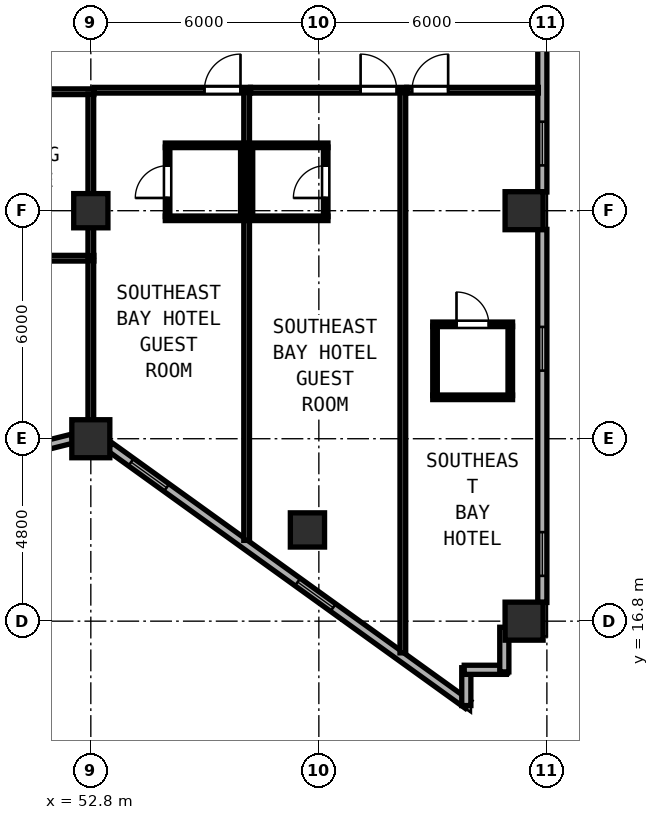
"""IFC4 building model, lengths in metres.
Left out: names, types, materials, properties, quantities, classifications, styles, units other than length and angle.
Written with IfcOpenShell. Run it as: python <this file> out.ifc"""

import sys

from ifc_helpers import new_model, si_unit, direction, frame, frame_2d, origin, origin_2d, place, context, subcontext, project, spatial, rectangle, hollow_rectangle, extrude, element, fill, save


model = new_model("IFC4")
c1 = context("Model", 3, precision=1e-05, world=origin(), true_north=direction((0.0, 1.0)))
c2 = subcontext(c1, "Body", "Model", "MODEL_VIEW")
j1 = project(units=[si_unit("LENGTHUNIT", "METRE"), si_unit("PLANEANGLEUNIT", "RADIAN")], contexts=[c1])
p1 = place(None, origin())
s1 = spatial("IfcSite", under=j1, at=p1, CompositionType="ELEMENT")
p2 = place(p1, origin())
s2 = spatial("IfcBuilding", under=s1, at=p2, CompositionType="ELEMENT")
p3 = place(p2, frame((0.0, 0.0, 152.4)))
s3 = spatial("IfcBuildingStorey", under=s2, at=p3, CompositionType="ELEMENT", Elevation=152.4)
for number, where, z_axis, x_axis in (
    (1, (52.8, 21.6, 0.0), (0.0, 0.0, 1.0), (1.0, 0.0, 0.0)),
    (2, (64.2, 16.8, 0.0), (0.0, 0.0, 1.0), (1.0, 0.0, 0.0)),
    (3, (64.2, 27.6, 0.0), (0.0, 0.0, 1.0), (1.0, 0.0, 0.0)),
):
    element("IfcColumn", number, at=place(p3, frame(where, z_axis=z_axis, x_axis=x_axis)), inside=s3, PredefinedType="COLUMN", context=c2, shape_type="SweptSolid", body=[
        extrude(hollow_rectangle(XDim=1.0, YDim=1.0, WallThickness=0.038, at=origin_2d()), origin(), (0.0, 0.0, 1.0), 3.8),
    ])
for number, where, z_axis, x_axis in (
    (4, (52.8, 27.6, 0.0), (0.0, 0.0, 1.0), (1.0, 0.0, 0.0)),
    (5, (58.5, 19.2, 0.0), (0.0, 0.0, 1.0), (1.0, 0.0, 0.0)),
):
    element("IfcColumn", number, at=place(p3, frame(where, z_axis=z_axis, x_axis=x_axis)), inside=s3, PredefinedType="COLUMN", context=c2, shape_type="SweptSolid", body=[
        extrude(hollow_rectangle(XDim=0.9, YDim=0.9, WallThickness=0.034, at=origin_2d()), origin(), (0.0, 0.0, 1.0), 3.8),
    ])
p4 = place(p3, frame((47.932, 20.507, 0.0), z_axis=(0.0, 0.0, 1.0), x_axis=(0.970145683738, 0.242522890311, 0.0)))
e6 = element("IfcWall", 6, at=p4, inside=s3, PredefinedType="SOLIDWALL", context=c2, shape_type="SweptSolid", body=[
    extrude(rectangle(XDim=4.511, YDim=0.24, at=frame_2d((2.255, 0.0))), origin(), (0.0, 0.0, 1.0), 3.145),
])
p5 = place(p4, frame((1.156, 0.0, 0.85)))
e7 = element("IfcOpeningElement", 7, at=p5, cuts=e6, PredefinedType="OPENING", context=c2, shape_type="SweptSolid", body=[
    extrude(rectangle(XDim=1.15, YDim=1.8, at=frame_2d((0.575, 0.9))), frame((0.0, 0.13, 0.0), z_axis=(0.0, -1.0, 0.0), x_axis=(1.0, 0.0, 0.0)), (0.0, 0.0, 1.0), 0.26),
])
p6 = place(p3, frame((53.292, 21.394, 0.0), z_axis=(0.0, 0.0, 1.0), x_axis=(0.811543504691, -0.584291998913, 0.0)))
e8 = element("IfcWall", 8, at=p6, inside=s3, PredefinedType="SOLIDWALL", context=c2, shape_type="SweptSolid", body=[
    extrude(rectangle(XDim=11.623, YDim=0.24, at=frame_2d((5.812, 0.0))), origin(), (0.0, 0.0, 1.0), 3.145),
])
p7 = place(p6, frame((0.7, 0.0, 0.85)))
e9 = element("IfcOpeningElement", 9, at=p7, cuts=e8, PredefinedType="OPENING", context=c2, shape_type="SweptSolid", body=[
    extrude(rectangle(XDim=1.15, YDim=1.8, at=frame_2d((0.575, 0.9))), frame((0.0, 0.13, 0.0), z_axis=(0.0, -1.0, 0.0), x_axis=(1.0, 0.0, 0.0)), (0.0, 0.0, 1.0), 0.26),
])
p8 = place(p6, frame((6.1, 0.0, 0.85)))
e10 = element("IfcOpeningElement", 10, at=p8, cuts=e8, PredefinedType="OPENING", context=c2, shape_type="SweptSolid", body=[
    extrude(rectangle(XDim=1.15, YDim=1.8, at=frame_2d((0.575, 0.9))), frame((0.0, 0.13, 0.0), z_axis=(0.0, -1.0, 0.0), x_axis=(1.0, 0.0, 0.0)), (0.0, 0.0, 1.0), 0.26),
])
p9 = place(p3, frame((62.68, 14.579, 0.0), z_axis=(0.0, 0.0, 1.0), x_axis=(0.0, 1.0, 0.0)))
e11 = element("IfcWall", 11, at=p9, inside=s3, PredefinedType="SOLIDWALL", context=c2, shape_type="SweptSolid", body=[
    extrude(rectangle(XDim=0.996, YDim=0.24, at=frame_2d((0.498, 0.0))), origin(), (0.0, 0.0, 1.0), 3.6),
])
p10 = place(p3, frame((62.625, 15.52, 0.0), z_axis=(0.0, 0.0, 1.0), x_axis=(1.0, 0.0, 0.0)))
e12 = element("IfcWall", 12, at=p10, inside=s3, PredefinedType="SOLIDWALL", context=c2, shape_type="SweptSolid", body=[
    extrude(rectangle(XDim=1.11, YDim=0.24, at=frame_2d((0.555, 0.0))), origin(), (0.0, 0.0, 1.0), 3.6),
])
p11 = place(p3, frame((63.68, 15.465, 0.0), z_axis=(0.0, 0.0, 1.0), x_axis=(0.0, 1.0, 0.0)))
e13 = element("IfcWall", 13, at=p11, inside=s3, PredefinedType="SOLIDWALL", context=c2, shape_type="SweptSolid", body=[
    extrude(rectangle(XDim=1.175, YDim=0.24, at=frame_2d((0.587, 0.0))), origin(), (0.0, 0.0, 1.0), 3.6),
])
p12 = place(p3, frame((64.68, 17.292, 0.0), z_axis=(0.0, 0.0, 1.0), x_axis=(0.0, 1.0, 0.0)))
e14 = element("IfcWall", 14, at=p12, inside=s3, PredefinedType="SOLIDWALL", context=c2, shape_type="SweptSolid", body=[
    extrude(rectangle(XDim=9.816, YDim=0.24, at=frame_2d((4.908, 0.0))), origin(), (0.0, 0.0, 1.0), 3.6),
])
p13 = place(p12, frame((0.7, 0.0, 0.85)))
e15 = element("IfcOpeningElement", 15, at=p13, cuts=e14, PredefinedType="OPENING", context=c2, shape_type="SweptSolid", body=[
    extrude(rectangle(XDim=1.15, YDim=1.8, at=frame_2d((0.575, 0.9))), frame((0.0, 0.13, 0.0), z_axis=(0.0, -1.0, 0.0), x_axis=(1.0, 0.0, 0.0)), (0.0, 0.0, 1.0), 0.26),
])
p14 = place(p12, frame((6.1, 0.0, 0.85)))
e16 = element("IfcOpeningElement", 16, at=p14, cuts=e14, PredefinedType="OPENING", context=c2, shape_type="SweptSolid", body=[
    extrude(rectangle(XDim=1.15, YDim=1.8, at=frame_2d((0.575, 0.9))), frame((0.0, 0.13, 0.0), z_axis=(0.0, -1.0, 0.0), x_axis=(1.0, 0.0, 0.0)), (0.0, 0.0, 1.0), 0.26),
])
p15 = place(p3, frame((64.68, 28.092, 0.0), z_axis=(0.0, 0.0, 1.0), x_axis=(0.0, 1.0, 0.0)))
e17 = element("IfcWall", 17, at=p15, inside=s3, PredefinedType="SOLIDWALL", context=c2, shape_type="SweptSolid", body=[
    extrude(rectangle(XDim=9.443, YDim=0.24, at=frame_2d((4.721, 0.0))), origin(), (0.0, 0.0, 1.0), 3.6),
])
p16 = place(p15, frame((0.7, 0.0, 0.85)))
e18 = element("IfcOpeningElement", 18, at=p16, cuts=e17, PredefinedType="OPENING", context=c2, shape_type="SweptSolid", body=[
    extrude(rectangle(XDim=1.15, YDim=1.8, at=frame_2d((0.575, 0.9))), frame((0.0, 0.13, 0.0), z_axis=(0.0, -1.0, 0.0), x_axis=(1.0, 0.0, 0.0)), (0.0, 0.0, 1.0), 0.26),
])
p17 = place(p15, frame((6.1, 0.0, 0.85)))
e19 = element("IfcOpeningElement", 19, at=p17, cuts=e17, PredefinedType="OPENING", context=c2, shape_type="SweptSolid", body=[
    extrude(rectangle(XDim=1.15, YDim=1.8, at=frame_2d((0.575, 0.9))), frame((0.0, 0.13, 0.0), z_axis=(0.0, -1.0, 0.0), x_axis=(1.0, 0.0, 0.0)), (0.0, 0.0, 1.0), 0.26),
])
for number, where, z_axis, x_axis in (
    (20, (49.08, 30.73, 0.0), (0.0, 0.0, 1.0), (1.0, 0.0, 0.0)),
    (21, (49.08, 26.35, 0.0), (0.0, 0.0, 1.0), (1.0, 0.0, 0.0)),
):
    element("IfcWall", number, at=place(p3, frame(where, z_axis=z_axis, x_axis=x_axis)), inside=s3, PredefinedType="PARTITIONING", context=c2, shape_type="SweptSolid", body=[
        extrude(rectangle(XDim=3.8, YDim=0.15, at=frame_2d((1.9, 0.0))), origin(), (0.0, 0.0, 1.0), 3.6),
    ])
p18 = place(p3, frame((52.8, 26.41, 0.0), z_axis=(0.0, 0.0, 1.0), x_axis=(0.0, 1.0, 0.0)))
e22 = element("IfcWall", 22, at=p18, inside=s3, PredefinedType="PARTITIONING", context=c2, shape_type="SweptSolid", body=[
    extrude(rectangle(XDim=4.26, YDim=0.15, at=frame_2d((2.13, 0.0))), origin(), (0.0, 0.0, 1.0), 3.145),
])
p19 = place(p3, frame((52.882, 30.77, 0.0), z_axis=(0.0, 0.0, 1.0), x_axis=(1.0, 0.0, 0.0)))
e23 = element("IfcWall", 23, at=p19, inside=s3, PredefinedType="PARTITIONING", context=c2, shape_type="SweptSolid", body=[
    extrude(rectangle(XDim=4.118, YDim=0.15, at=frame_2d((2.059, 0.0))), origin(), (0.0, 0.0, 1.0), 3.6),
])
p20 = place(p19, frame((3.856, 0.0, 0.0), z_axis=(0.0, 0.0, 1.0), x_axis=(-1.0, 0.0, 0.0)))
e24 = element("IfcOpeningElement", 24, at=p20, cuts=e23, PredefinedType="OPENING", context=c2, shape_type="SweptSolid", body=[
    extrude(rectangle(XDim=0.95, YDim=2.15, at=frame_2d((0.475, 1.075))), frame((0.0, 0.085, 0.0), z_axis=(0.0, -1.0, 0.0), x_axis=(1.0, 0.0, 0.0)), (0.0, 0.0, 1.0), 0.17),
])
p21 = place(p3, frame((52.8, 21.819, 0.0), z_axis=(0.0, 0.0, 1.0), x_axis=(0.0, 1.0, 0.0)))
e25 = element("IfcWall", 25, at=p21, inside=s3, PredefinedType="PARTITIONING", context=c2, shape_type="SweptSolid", body=[
    extrude(rectangle(XDim=4.471, YDim=0.15, at=frame_2d((2.236, 0.0))), origin(), (0.0, 0.0, 1.0), 3.145),
])
p22 = place(p3, frame((56.9, 18.925, 0.0), z_axis=(0.0, 0.0, 1.0), x_axis=(0.0, 1.0, 0.0)))
e26 = element("IfcWall", 26, at=p22, inside=s3, PredefinedType="PARTITIONING", context=c2, shape_type="SweptSolid", body=[
    extrude(rectangle(XDim=11.785, YDim=0.15, at=frame_2d((5.892, 0.0))), origin(), (0.0, 0.0, 1.0), 3.6),
])
p23 = place(p3, frame((54.76, 29.32, 0.0), z_axis=(0.0, 0.0, 1.0), x_axis=(1.0, 0.0, 0.0)))
e27 = element("IfcWall", 27, at=p23, inside=s3, PredefinedType="PARTITIONING", context=c2, shape_type="SweptSolid", body=[
    extrude(rectangle(XDim=2.08, YDim=0.12, at=frame_2d((1.04, 0.0))), origin(), (0.0, 0.0, 1.0), 3.6),
])
p24 = place(p3, frame((54.76, 27.4, 0.0), z_axis=(0.0, 0.0, 1.0), x_axis=(1.0, 0.0, 0.0)))
e28 = element("IfcWall", 28, at=p24, inside=s3, PredefinedType="PARTITIONING", context=c2, shape_type="SweptSolid", body=[
    extrude(rectangle(XDim=2.08, YDim=0.12, at=frame_2d((1.04, 0.0))), origin(), (0.0, 0.0, 1.0), 3.145),
])
p25 = place(p3, frame((54.82, 27.445, 0.0), z_axis=(0.0, 0.0, 1.0), x_axis=(0.0, 1.0, 0.0)))
e29 = element("IfcWall", 29, at=p25, inside=s3, PredefinedType="PARTITIONING", context=c2, shape_type="SweptSolid", body=[
    extrude(rectangle(XDim=1.83, YDim=0.12, at=frame_2d((0.915, 0.0))), origin(), (0.0, 0.0, 1.0), 3.6),
])
p26 = place(p25, frame((1.34, 0.0, 0.0), z_axis=(0.0, 0.0, 1.0), x_axis=(-1.0, 0.0, 0.0)))
e30 = element("IfcOpeningElement", 30, at=p26, cuts=e29, PredefinedType="OPENING", context=c2, shape_type="SweptSolid", body=[
    extrude(rectangle(XDim=0.85, YDim=2.1, at=frame_2d((0.425, 1.05))), frame((0.0, 0.07, 0.0), z_axis=(0.0, -1.0, 0.0), x_axis=(1.0, 0.0, 0.0)), (0.0, 0.0, 1.0), 0.14),
])
p27 = place(p3, frame((56.8, 27.445, 0.0), z_axis=(0.0, 0.0, 1.0), x_axis=(0.0, 1.0, 0.0)))
e31 = element("IfcWall", 31, at=p27, inside=s3, PredefinedType="PARTITIONING", context=c2, shape_type="SweptSolid", body=[
    extrude(rectangle(XDim=1.83, YDim=0.12, at=frame_2d((0.915, 0.0))), origin(), (0.0, 0.0, 1.0), 3.6),
])
p28 = place(p3, frame((57.002, 30.77, 0.0), z_axis=(0.0, 0.0, 1.0), x_axis=(1.0, 0.0, 0.0)))
e32 = element("IfcWall", 32, at=p28, inside=s3, PredefinedType="PARTITIONING", context=c2, shape_type="SweptSolid", body=[
    extrude(rectangle(XDim=4.108, YDim=0.15, at=frame_2d((2.054, 0.0))), origin(), (0.0, 0.0, 1.0), 3.6),
])
p29 = place(p28, frame((3.846, 0.0, 0.0), z_axis=(0.0, 0.0, 1.0), x_axis=(-1.0, 0.0, 0.0)))
e33 = element("IfcOpeningElement", 33, at=p29, cuts=e32, PredefinedType="OPENING", context=c2, shape_type="SweptSolid", body=[
    extrude(rectangle(XDim=0.95, YDim=2.15, at=frame_2d((0.475, 1.075))), frame((0.0, 0.085, 0.0), z_axis=(0.0, -1.0, 0.0), x_axis=(1.0, 0.0, 0.0)), (0.0, 0.0, 1.0), 0.17),
])
p30 = place(p3, frame((61.01, 15.966, 0.0), z_axis=(0.0, 0.0, 1.0), x_axis=(0.0, 1.0, 0.0)))
e34 = element("IfcWall", 34, at=p30, inside=s3, PredefinedType="PARTITIONING", context=c2, shape_type="SweptSolid", body=[
    extrude(rectangle(XDim=14.744, YDim=0.15, at=frame_2d((7.372, 0.0))), origin(), (0.0, 0.0, 1.0), 3.6),
])
p31 = place(p3, frame((56.96, 29.32, 0.0), z_axis=(0.0, 0.0, 1.0), x_axis=(1.0, 0.0, 0.0)))
e35 = element("IfcWall", 35, at=p31, inside=s3, PredefinedType="PARTITIONING", context=c2, shape_type="SweptSolid", body=[
    extrude(rectangle(XDim=2.08, YDim=0.12, at=frame_2d((1.04, 0.0))), origin(), (0.0, 0.0, 1.0), 3.6),
])
p32 = place(p3, frame((56.96, 27.4, 0.0), z_axis=(0.0, 0.0, 1.0), x_axis=(1.0, 0.0, 0.0)))
e36 = element("IfcWall", 36, at=p32, inside=s3, PredefinedType="PARTITIONING", context=c2, shape_type="SweptSolid", body=[
    extrude(rectangle(XDim=2.08, YDim=0.12, at=frame_2d((1.04, 0.0))), origin(), (0.0, 0.0, 1.0), 3.145),
])
p33 = place(p3, frame((57.0, 27.445, 0.0), z_axis=(0.0, 0.0, 1.0), x_axis=(0.0, 1.0, 0.0)))
e37 = element("IfcWall", 37, at=p33, inside=s3, PredefinedType="PARTITIONING", context=c2, shape_type="SweptSolid", body=[
    extrude(rectangle(XDim=1.83, YDim=0.12, at=frame_2d((0.915, 0.0))), origin(), (0.0, 0.0, 1.0), 3.6),
])
p34 = place(p3, frame((58.98, 27.445, 0.0), z_axis=(0.0, 0.0, 1.0), x_axis=(0.0, 1.0, 0.0)))
e38 = element("IfcWall", 38, at=p34, inside=s3, PredefinedType="PARTITIONING", context=c2, shape_type="SweptSolid", body=[
    extrude(rectangle(XDim=1.83, YDim=0.12, at=frame_2d((0.915, 0.0))), origin(), (0.0, 0.0, 1.0), 3.6),
])
p35 = place(p34, frame((0.49, 0.0, 0.0)))
e39 = element("IfcOpeningElement", 39, at=p35, cuts=e38, PredefinedType="OPENING", context=c2, shape_type="SweptSolid", body=[
    extrude(rectangle(XDim=0.85, YDim=2.1, at=frame_2d((0.425, 1.05))), frame((0.0, 0.07, 0.0), z_axis=(0.0, -1.0, 0.0), x_axis=(1.0, 0.0, 0.0)), (0.0, 0.0, 1.0), 0.14),
])
p36 = place(p3, frame((61.112, 30.77, 0.0), z_axis=(0.0, 0.0, 1.0), x_axis=(1.0, 0.0, 0.0)))
e40 = element("IfcWall", 40, at=p36, inside=s3, PredefinedType="PARTITIONING", context=c2, shape_type="SweptSolid", body=[
    extrude(rectangle(XDim=3.463, YDim=0.15, at=frame_2d((1.731, 0.0))), origin(), (0.0, 0.0, 1.0), 3.6),
])
p37 = place(p36, frame((1.09, 0.0, 0.0), z_axis=(0.0, 0.0, 1.0), x_axis=(-1.0, 0.0, 0.0)))
e41 = element("IfcOpeningElement", 41, at=p37, cuts=e40, PredefinedType="OPENING", context=c2, shape_type="SweptSolid", body=[
    extrude(rectangle(XDim=0.95, YDim=2.15, at=frame_2d((0.475, 1.075))), frame((0.0, 0.085, 0.0), z_axis=(0.0, -1.0, 0.0), x_axis=(1.0, 0.0, 0.0)), (0.0, 0.0, 1.0), 0.17),
])
p38 = place(p3, frame((61.797, 24.61, 0.0), z_axis=(0.0, 0.0, 1.0), x_axis=(1.0, 0.0, 0.0)))
e42 = element("IfcWall", 42, at=p38, inside=s3, PredefinedType="PARTITIONING", context=c2, shape_type="SweptSolid", body=[
    extrude(rectangle(XDim=2.1, YDim=0.12, at=frame_2d((1.05, 0.0))), origin(), (0.0, 0.0, 1.0), 3.6),
])
p39 = place(p38, frame((1.475, 0.0, 0.0), z_axis=(0.0, 0.0, 1.0), x_axis=(-1.0, 0.0, 0.0)))
e43 = element("IfcOpeningElement", 43, at=p39, cuts=e42, PredefinedType="OPENING", context=c2, shape_type="SweptSolid", body=[
    extrude(rectangle(XDim=0.85, YDim=2.1, at=frame_2d((0.425, 1.05))), frame((0.0, 0.07, 0.0), z_axis=(0.0, -1.0, 0.0), x_axis=(1.0, 0.0, 0.0)), (0.0, 0.0, 1.0), 0.14),
])
p40 = place(p3, frame((61.797, 22.69, 0.0), z_axis=(0.0, 0.0, 1.0), x_axis=(1.0, 0.0, 0.0)))
e44 = element("IfcWall", 44, at=p40, inside=s3, PredefinedType="PARTITIONING", context=c2, shape_type="SweptSolid", body=[
    extrude(rectangle(XDim=2.1, YDim=0.12, at=frame_2d((1.05, 0.0))), origin(), (0.0, 0.0, 1.0), 3.6),
])
for number, where, z_axis, x_axis in (
    (45, (61.857, 22.735, 0.0), (0.0, 0.0, 1.0), (0.0, 1.0, 0.0)),
    (46, (63.837, 22.735, 0.0), (0.0, 0.0, 1.0), (0.0, 1.0, 0.0)),
):
    element("IfcWall", number, at=place(p3, frame(where, z_axis=z_axis, x_axis=x_axis)), inside=s3, PredefinedType="PARTITIONING", context=c2, shape_type="SweptSolid", body=[
        extrude(rectangle(XDim=1.83, YDim=0.12, at=frame_2d((0.915, 0.0))), origin(), (0.0, 0.0, 1.0), 3.6),
    ])
p41 = place(p7, origin())
e47 = element("IfcWindow", 47, at=p41, inside=s3, PartitioningType="SINGLE_PANEL", PredefinedType="WINDOW", context=c2, shape_type="SweptSolid", body=[
    extrude(rectangle(XDim=1.15, YDim=1.8, at=frame_2d((0.575, 0.9))), frame((0.0, 0.03, 0.0), z_axis=(0.0, -1.0, 0.0), x_axis=(1.0, 0.0, 0.0)), (0.0, 0.0, 1.0), 0.06),
])
fill(e9, e47)
p42 = place(p8, origin())
e48 = element("IfcWindow", 48, at=p42, inside=s3, PartitioningType="SINGLE_PANEL", PredefinedType="WINDOW", context=c2, shape_type="SweptSolid", body=[
    extrude(rectangle(XDim=1.15, YDim=1.8, at=frame_2d((0.575, 0.9))), frame((0.0, 0.03, 0.0), z_axis=(0.0, -1.0, 0.0), x_axis=(1.0, 0.0, 0.0)), (0.0, 0.0, 1.0), 0.06),
])
fill(e10, e48)
p43 = place(p13, origin())
e49 = element("IfcWindow", 49, at=p43, inside=s3, PartitioningType="SINGLE_PANEL", PredefinedType="WINDOW", context=c2, shape_type="SweptSolid", body=[
    extrude(rectangle(XDim=1.15, YDim=1.8, at=frame_2d((0.575, 0.9))), frame((0.0, 0.03, 0.0), z_axis=(0.0, -1.0, 0.0), x_axis=(1.0, 0.0, 0.0)), (0.0, 0.0, 1.0), 0.06),
])
fill(e15, e49)
p44 = place(p14, origin())
e50 = element("IfcWindow", 50, at=p44, inside=s3, PartitioningType="SINGLE_PANEL", PredefinedType="WINDOW", context=c2, shape_type="SweptSolid", body=[
    extrude(rectangle(XDim=1.15, YDim=1.8, at=frame_2d((0.575, 0.9))), frame((0.0, 0.03, 0.0), z_axis=(0.0, -1.0, 0.0), x_axis=(1.0, 0.0, 0.0)), (0.0, 0.0, 1.0), 0.06),
])
fill(e16, e50)
p45 = place(p16, origin())
e51 = element("IfcWindow", 51, at=p45, inside=s3, PartitioningType="SINGLE_PANEL", PredefinedType="WINDOW", context=c2, shape_type="SweptSolid", body=[
    extrude(rectangle(XDim=1.15, YDim=1.8, at=frame_2d((0.575, 0.9))), frame((0.0, 0.03, 0.0), z_axis=(0.0, -1.0, 0.0), x_axis=(1.0, 0.0, 0.0)), (0.0, 0.0, 1.0), 0.06),
])
fill(e18, e51)
p46 = place(p20, origin())
e52 = element("IfcDoor", 52, at=p46, inside=s3, OperationType="SINGLE_SWING_LEFT", PredefinedType="DOOR", context=c2, shape_type="SweptSolid", body=[
    extrude(rectangle(XDim=0.95, YDim=2.15, at=frame_2d((0.475, 1.075))), frame((0.0, 0.025, 0.0), z_axis=(0.0, -1.0, 0.0), x_axis=(1.0, 0.0, 0.0)), (0.0, 0.0, 1.0), 0.05),
])
fill(e24, e52)
p47 = place(p26, origin())
e53 = element("IfcDoor", 53, at=p47, inside=s3, OperationType="SINGLE_SWING_RIGHT", PredefinedType="DOOR", context=c2, shape_type="SweptSolid", body=[
    extrude(rectangle(XDim=0.85, YDim=2.1, at=frame_2d((0.425, 1.05))), frame((0.0, 0.025, 0.0), z_axis=(0.0, -1.0, 0.0), x_axis=(1.0, 0.0, 0.0)), (0.0, 0.0, 1.0), 0.05),
])
fill(e30, e53)
p48 = place(p29, origin())
e54 = element("IfcDoor", 54, at=p48, inside=s3, OperationType="SINGLE_SWING_RIGHT", PredefinedType="DOOR", context=c2, shape_type="SweptSolid", body=[
    extrude(rectangle(XDim=0.95, YDim=2.15, at=frame_2d((0.475, 1.075))), frame((0.0, 0.025, 0.0), z_axis=(0.0, -1.0, 0.0), x_axis=(1.0, 0.0, 0.0)), (0.0, 0.0, 1.0), 0.05),
])
fill(e33, e54)
p49 = place(p35, origin())
e55 = element("IfcDoor", 55, at=p49, inside=s3, OperationType="SINGLE_SWING_LEFT", PredefinedType="DOOR", context=c2, shape_type="SweptSolid", body=[
    extrude(rectangle(XDim=0.85, YDim=2.1, at=frame_2d((0.425, 1.05))), frame((0.0, 0.025, 0.0), z_axis=(0.0, -1.0, 0.0), x_axis=(1.0, 0.0, 0.0)), (0.0, 0.0, 1.0), 0.05),
])
fill(e39, e55)
p50 = place(p37, origin())
e56 = element("IfcDoor", 56, at=p50, inside=s3, OperationType="SINGLE_SWING_LEFT", PredefinedType="DOOR", context=c2, shape_type="SweptSolid", body=[
    extrude(rectangle(XDim=0.95, YDim=2.15, at=frame_2d((0.475, 1.075))), frame((0.0, 0.025, 0.0), z_axis=(0.0, -1.0, 0.0), x_axis=(1.0, 0.0, 0.0)), (0.0, 0.0, 1.0), 0.05),
])
fill(e41, e56)
p51 = place(p39, origin())
e57 = element("IfcDoor", 57, at=p51, inside=s3, OperationType="SINGLE_SWING_RIGHT", PredefinedType="DOOR", context=c2, shape_type="SweptSolid", body=[
    extrude(rectangle(XDim=0.85, YDim=2.1, at=frame_2d((0.425, 1.05))), frame((0.0, 0.025, 0.0), z_axis=(0.0, -1.0, 0.0), x_axis=(1.0, 0.0, 0.0)), (0.0, 0.0, 1.0), 0.05),
])
fill(e43, e57)
save(model, sys.argv[1])
